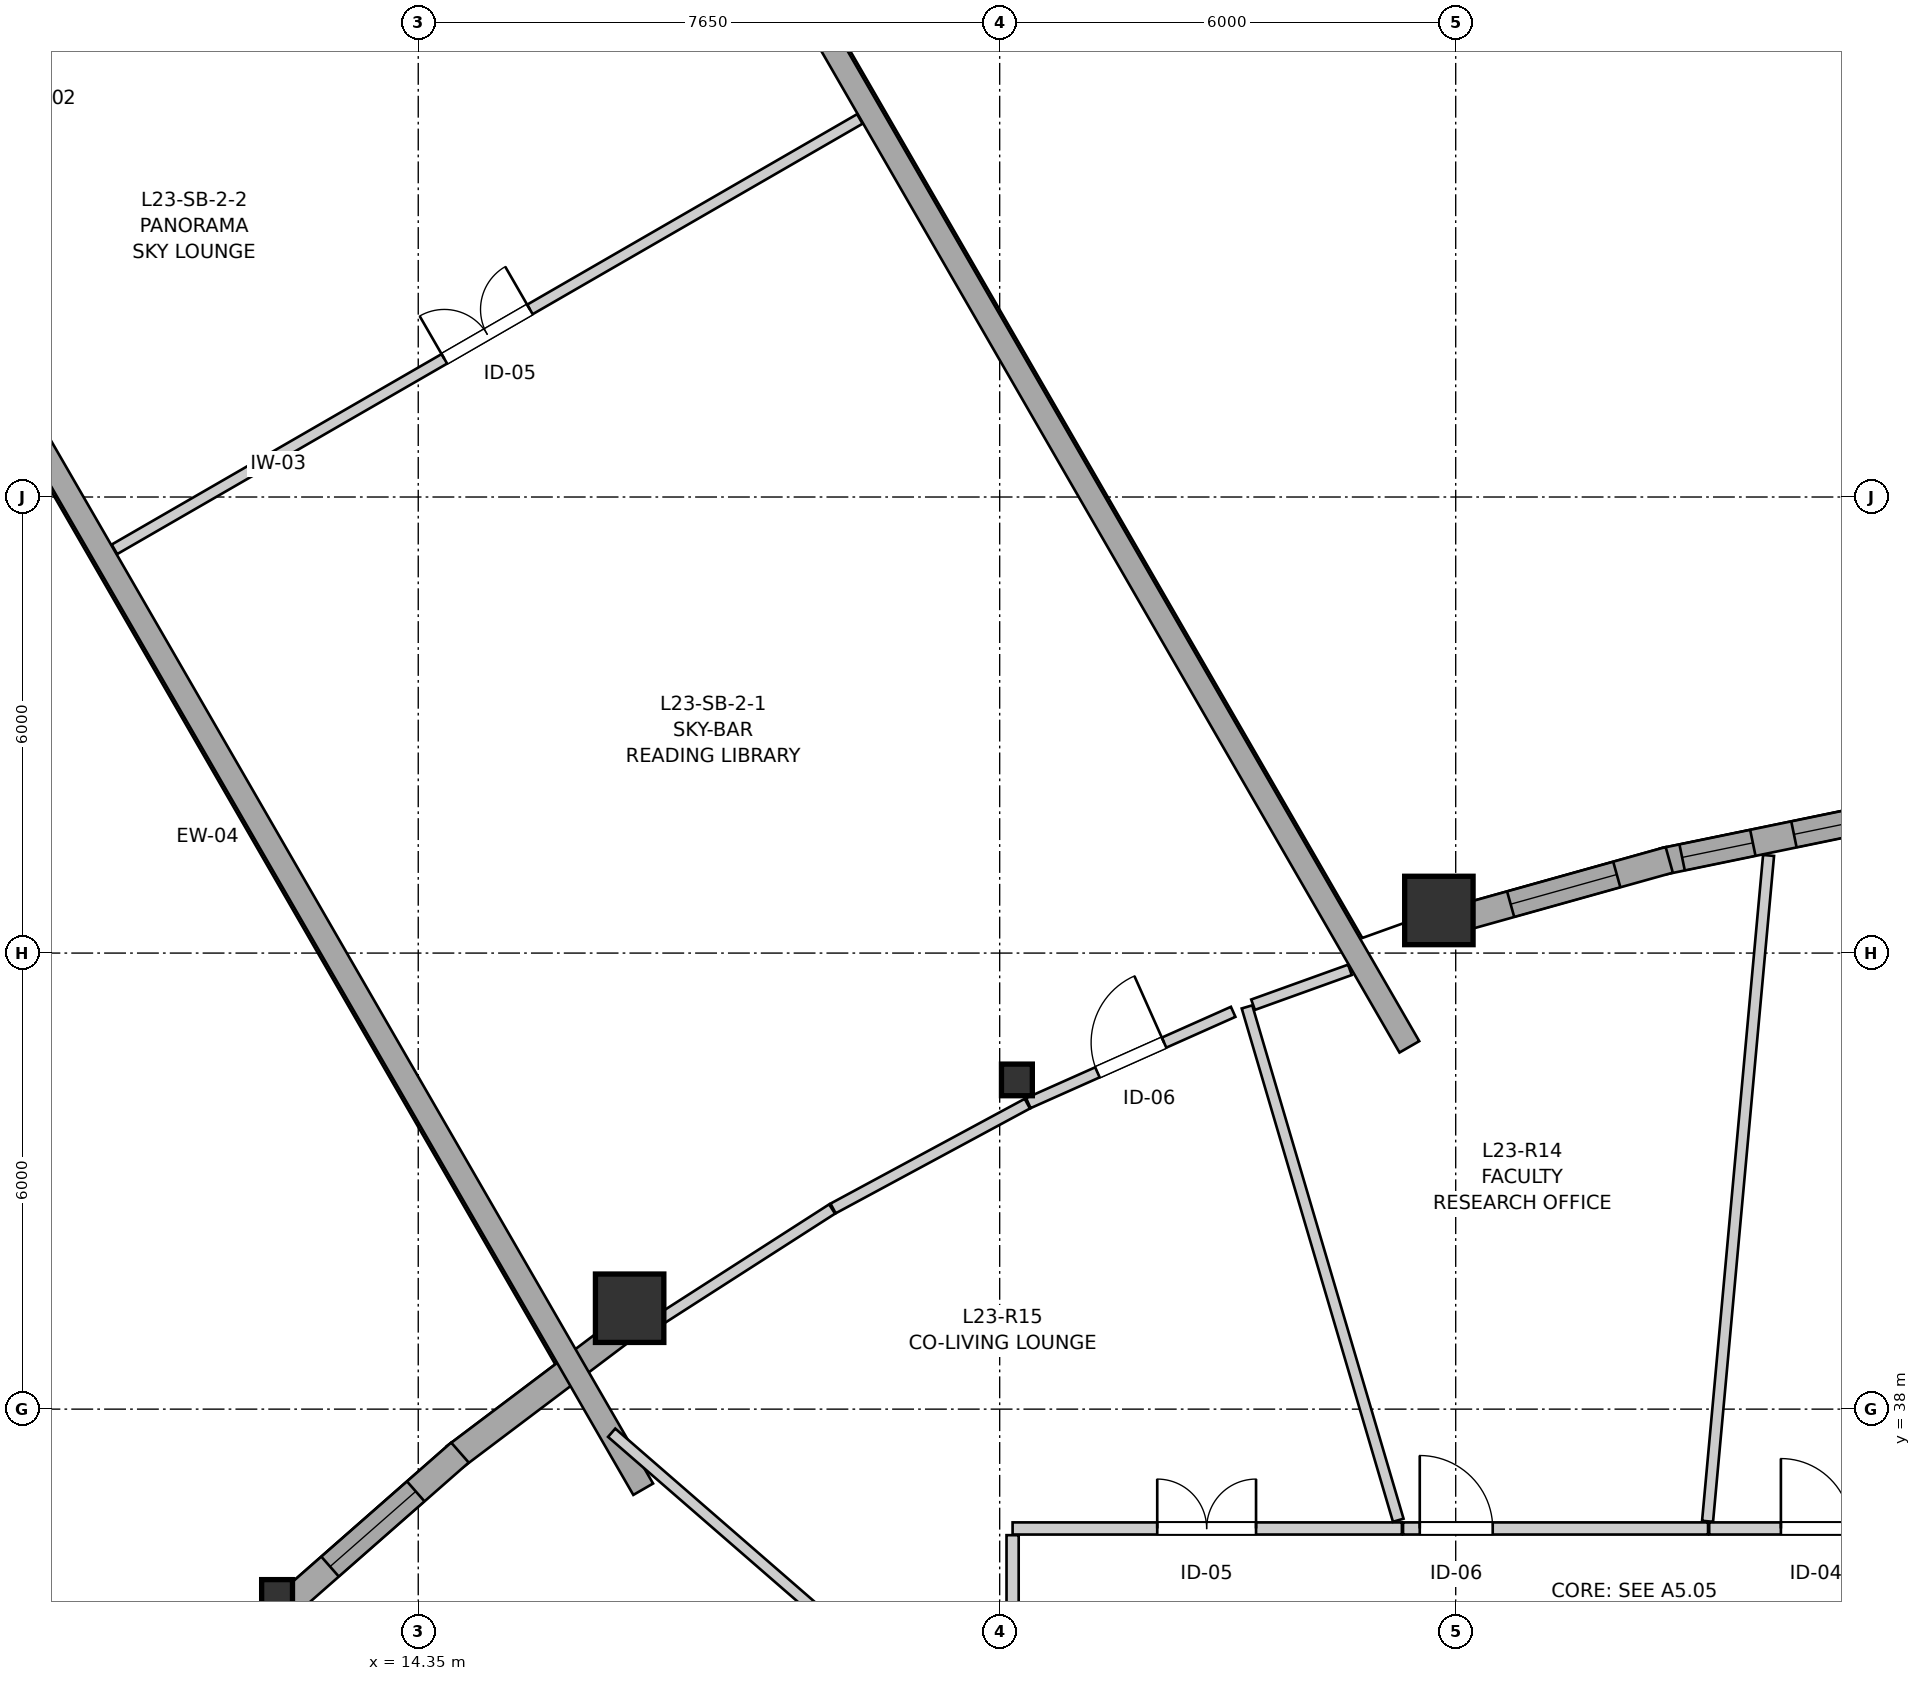
"""IFC4 building model, lengths in metres.
Left out: names, types, materials, properties, quantities, classifications, styles, units other than length and angle.
Written with IfcOpenShell. Run it as: python <this file> out.ifc"""

import sys

from ifc_helpers import new_model, si_unit, direction, frame, frame_2d, origin, origin_2d, place, context, subcontext, project, spatial, rectangle, i_section, extrude, source, transform, mapped, element, fill, save


model = new_model("IFC4")
c1 = context("Model", 3, precision=1e-05, world=origin(), true_north=direction((0.0, 1.0)))
c2 = subcontext(c1, "Body", "Model", "MODEL_VIEW")
j1 = project(units=[si_unit("LENGTHUNIT", "METRE"), si_unit("PLANEANGLEUNIT", "RADIAN")], contexts=[c1])
p1 = place(None, origin())
s1 = spatial("IfcSite", under=j1, at=p1, CompositionType="ELEMENT")
p2 = place(p1, origin())
s2 = spatial("IfcBuilding", under=s1, at=p2, CompositionType="ELEMENT")
p3 = place(p2, frame((0.0, 0.0, 80.0)))
s3 = spatial("IfcBuildingStorey", under=s2, at=p3, CompositionType="ELEMENT", Elevation=80.0)
m1 = source(origin(), c2, "Body", "SweptSolid", [
    extrude(rectangle(XDim=0.9, YDim=0.9, at=origin_2d()), origin(), (0.0, 0.0, 1.0), 2.935),
])
p4 = place(p3, frame((27.779, 44.561, 0.0), z_axis=(0.0, 0.0, 1.0), x_axis=(1.0, 0.0, 0.0)))
e1 = element("IfcColumn", 1, at=p4, inside=s3, PredefinedType="COLUMN", context=c2, shape_type="MappedRepresentation", body=[
    mapped(m1, transform((0.0, 0.0, 0.0), x_axis=(1.0, 0.0, 0.0), y_axis=(0.0, 1.0, 0.0), z_axis=(0.0, 0.0, 1.0), scale=1.0)),
])
m2 = source(origin(), c2, "Body", "SweptSolid", [
    extrude(i_section(OverallWidth=0.406, OverallDepth=0.416, WebThickness=0.027, FlangeThickness=0.044, FilletRadius=0.015, at=origin_2d()), origin(), (0.0, 0.0, 1.0), 2.935),
])
p5 = place(p3, frame((22.227, 42.331, 0.0), z_axis=(0.0, 0.0, 1.0), x_axis=(1.0, 0.0, 0.0)))
e2 = element("IfcColumn", 2, at=p5, inside=s3, PredefinedType="PILASTER", context=c2, shape_type="MappedRepresentation", body=[
    mapped(m2, transform((0.0, 0.0, 0.0), x_axis=(1.0, 0.0, 0.0), y_axis=(0.0, 1.0, 0.0), z_axis=(0.0, 0.0, 1.0), scale=1.0)),
])
p6 = place(p3, frame((17.131, 39.327, 0.0), z_axis=(0.0, 0.0, 1.0), x_axis=(1.0, 0.0, 0.0)))
e3 = element("IfcColumn", 3, at=p6, inside=s3, PredefinedType="COLUMN", context=c2, shape_type="MappedRepresentation", body=[
    mapped(m1, transform((0.0, 0.0, 0.0), x_axis=(1.0, 0.0, 0.0), y_axis=(0.0, 1.0, 0.0), z_axis=(0.0, 0.0, 1.0), scale=1.0)),
])
p7 = place(p3, frame((12.493, 35.549, 0.0), z_axis=(0.0, 0.0, 1.0), x_axis=(1.0, 0.0, 0.0)))
e4 = element("IfcColumn", 4, at=p7, inside=s3, PredefinedType="PILASTER", context=c2, shape_type="MappedRepresentation", body=[
    mapped(m2, transform((0.0, 0.0, 0.0), x_axis=(1.0, 0.0, 0.0), y_axis=(0.0, 1.0, 0.0), z_axis=(0.0, 0.0, 1.0), scale=1.0)),
])
p8 = place(p3, frame((33.803, 45.84, 0.0), z_axis=(0.0, 0.0, 1.0), x_axis=(-0.97943222174, -0.201773444777, 0.0)))
e5 = element("IfcWall", 5, at=p8, inside=s3, PredefinedType="SOLIDWALL", context=c2, shape_type="SweptSolid", body=[
    extrude(rectangle(XDim=3.144, YDim=0.35, at=frame_2d((1.572, 0.0))), origin(), (0.0, 0.0, 1.0), 2.465),
])
p9 = place(p8, frame((0.431, 0.0, 0.82)))
e6 = element("IfcOpeningElement", 6, at=p9, cuts=e5, PredefinedType="OPENING", context=c2, shape_type="SweptSolid", body=[
    extrude(rectangle(XDim=0.95, YDim=1.35, at=frame_2d((0.475, 0.675))), frame((0.0, 0.185, 0.0), z_axis=(0.0, -1.0, 0.0), x_axis=(1.0, 0.0, 0.0)), (0.0, 0.0, 1.0), 0.37),
])
p10 = place(p8, frame((1.933, 0.0, 0.82)))
e7 = element("IfcOpeningElement", 7, at=p10, cuts=e5, PredefinedType="OPENING", context=c2, shape_type="SweptSolid", body=[
    extrude(rectangle(XDim=0.95, YDim=1.35, at=frame_2d((0.475, 0.675))), frame((0.0, 0.185, 0.0), z_axis=(0.0, -1.0, 0.0), x_axis=(1.0, 0.0, 0.0)), (0.0, 0.0, 1.0), 0.37),
])
p11 = place(p3, frame((30.809, 45.227, 0.0), z_axis=(0.0, 0.0, 1.0), x_axis=(-0.963041637143, -0.269352566591, 0.0)))
e8 = element("IfcWall", 8, at=p11, inside=s3, PredefinedType="SOLIDWALL", context=c2, shape_type="SweptSolid", body=[
    extrude(rectangle(XDim=2.873, YDim=0.35, at=frame_2d((1.437, 0.0))), origin(), (0.0, 0.0, 1.0), 2.465),
])
p12 = place(p11, frame((0.717, 0.0, 0.82)))
e9 = element("IfcOpeningElement", 9, at=p12, cuts=e8, PredefinedType="OPENING", context=c2, shape_type="SweptSolid", body=[
    extrude(rectangle(XDim=1.45, YDim=1.25, at=frame_2d((0.725, 0.625))), frame((0.0, 0.185, 0.0), z_axis=(0.0, -1.0, 0.0), x_axis=(1.0, 0.0, 0.0)), (0.0, 0.0, 1.0), 0.37),
])
p13 = place(p3, frame((17.057, 39.052, 0.0), z_axis=(0.0, 0.0, 1.0), x_axis=(-0.798379678642, -0.602154372841, 0.0)))
e10 = element("IfcWall", 10, at=p13, inside=s3, PredefinedType="SOLIDWALL", context=c2, shape_type="SweptSolid", body=[
    extrude(rectangle(XDim=2.79, YDim=0.35, at=frame_2d((1.395, 0.0))), origin(), (0.0, 0.0, 1.0), 2.465),
])
p14 = place(p3, frame((14.899, 37.429, 0.0), z_axis=(0.0, 0.0, 1.0), x_axis=(-0.751526984469, -0.659702350773, 0.0)))
e11 = element("IfcWall", 11, at=p14, inside=s3, PredefinedType="SOLIDWALL", context=c2, shape_type="SweptSolid", body=[
    extrude(rectangle(XDim=3.028, YDim=0.35, at=frame_2d((1.514, 0.0))), origin(), (0.0, 0.0, 1.0), 2.465),
])
p15 = place(p14, frame((0.774, 0.0, 0.82)))
e12 = element("IfcOpeningElement", 12, at=p15, cuts=e11, PredefinedType="OPENING", context=c2, shape_type="SweptSolid", body=[
    extrude(rectangle(XDim=1.5, YDim=1.45, at=frame_2d((0.75, 0.725))), frame((0.0, 0.185, 0.0), z_axis=(0.0, -1.0, 0.0), x_axis=(1.0, 0.0, 0.0)), (0.0, 0.0, 1.0), 0.37),
])
p16 = place(p3, frame((12.603, 35.412, 0.0), z_axis=(0.0, 0.0, 1.0), x_axis=(-0.701972782373, -0.71220377197, 0.0)))
e13 = element("IfcWall", 13, at=p16, inside=s3, PredefinedType="SOLIDWALL", context=c2, shape_type="SweptSolid", body=[
    extrude(rectangle(XDim=3.078, YDim=0.35, at=frame_2d((1.539, 0.0))), origin(), (0.0, 0.0, 1.0), 2.465),
])
p17 = place(p16, frame((0.854, 0.0, 0.82)))
e14 = element("IfcOpeningElement", 14, at=p17, cuts=e13, PredefinedType="OPENING", context=c2, shape_type="SweptSolid", body=[
    extrude(rectangle(XDim=1.35, YDim=1.45, at=frame_2d((0.675, 0.725))), frame((0.0, 0.185, 0.0), z_axis=(0.0, -1.0, 0.0), x_axis=(1.0, 0.0, 0.0)), (0.0, 0.0, 1.0), 0.37),
])
for number, where, z_axis, x_axis in (
    (15, (17.31, 36.946, 0.0), (0.0, 0.0, 1.0), (-0.5, 0.866, 0.0)),
    (16, (27.39, 42.766, 0.0), (0.0, 0.0, 1.0), (-0.5, 0.866, 0.0)),
):
    element("IfcWall", number, at=place(p3, frame(where, z_axis=z_axis, x_axis=x_axis)), inside=s3, PredefinedType="SOLIDWALL", context=c2, shape_type="SweptSolid", body=[
        extrude(rectangle(XDim=20.603, YDim=0.3, at=frame_2d((10.302, 0.0))), origin(), (0.0, 0.0, 1.0), 2.115),
    ])
p18 = place(p3, frame((10.353, 49.312, 0.0), z_axis=(0.0, 0.0, 1.0), x_axis=(0.866036235619, 0.499981238243, 0.0)))
e17 = element("IfcWall", 17, at=p18, inside=s3, PredefinedType="PARTITIONING", context=c2, shape_type="SweptSolid", body=[
    extrude(rectangle(XDim=11.324, YDim=0.145, at=frame_2d((5.662, 0.0))), origin(), (0.0, 0.0, 1.0), 2.353),
])
p19 = place(p18, frame((5.012, 0.0, 0.0)))
e18 = element("IfcOpeningElement", 18, at=p19, cuts=e17, PredefinedType="OPENING", context=c2, shape_type="SweptSolid", body=[
    extrude(rectangle(XDim=1.3, YDim=2.1, at=frame_2d((0.65, 1.05))), frame((0.0, 0.083, 0.0), z_axis=(0.0, -1.0, 0.0), x_axis=(1.0, 0.0, 0.0)), (0.0, 0.0, 1.0), 0.165),
])
p20 = place(p3, frame((22.17, 36.43, 0.0), z_axis=(0.0, 0.0, 1.0), x_axis=(1.0, 0.0, 0.0)))
e19 = element("IfcWall", 19, at=p20, inside=s3, PredefinedType="PARTITIONING", context=c2, shape_type="SweptSolid", body=[
    extrude(rectangle(XDim=5.122, YDim=0.16, at=frame_2d((2.561, 0.0))), origin(), (0.0, 0.0, 1.0), 2.573),
])
p21 = place(p20, frame((1.903, 0.0, 0.0)))
e20 = element("IfcOpeningElement", 20, at=p21, cuts=e19, PredefinedType="OPENING", context=c2, shape_type="SweptSolid", body=[
    extrude(rectangle(XDim=1.3, YDim=2.1, at=frame_2d((0.65, 1.05))), frame((0.0, 0.09, 0.0), z_axis=(0.0, -1.0, 0.0), x_axis=(1.0, 0.0, 0.0)), (0.0, 0.0, 1.0), 0.18),
])
p22 = place(p3, frame((27.307, 36.43, 0.0), z_axis=(0.0, 0.0, 1.0), x_axis=(1.0, 0.0, 0.0)))
e21 = element("IfcWall", 21, at=p22, inside=s3, PredefinedType="PARTITIONING", context=c2, shape_type="SweptSolid", body=[
    extrude(rectangle(XDim=4.013, YDim=0.16, at=frame_2d((2.007, 0.0))), origin(), (0.0, 0.0, 1.0), 2.935),
])
p23 = place(p22, frame((0.22, 0.0, 0.0)))
e22 = element("IfcOpeningElement", 22, at=p23, cuts=e21, PredefinedType="OPENING", context=c2, shape_type="SweptSolid", body=[
    extrude(rectangle(XDim=0.96, YDim=2.1, at=frame_2d((0.48, 1.05))), frame((0.0, 0.09, 0.0), z_axis=(0.0, -1.0, 0.0), x_axis=(1.0, 0.0, 0.0)), (0.0, 0.0, 1.0), 0.18),
])
p24 = place(p3, frame((22.377, 42.026, 0.0), z_axis=(0.0, 0.0, 1.0), x_axis=(0.913387960111, 0.407090204162, 0.0)))
e23 = element("IfcWall", 23, at=p24, inside=s3, PredefinedType="PARTITIONING", context=c2, shape_type="SweptSolid", body=[
    extrude(rectangle(XDim=2.951, YDim=0.145, at=frame_2d((1.475, 0.0))), origin(), (0.0, 0.0, 1.0), 2.453),
])
p25 = place(p24, frame((0.995, 0.0, 0.0)))
e24 = element("IfcOpeningElement", 24, at=p25, cuts=e23, PredefinedType="OPENING", context=c2, shape_type="SweptSolid", body=[
    extrude(rectangle(XDim=0.96, YDim=2.1, at=frame_2d((0.48, 1.05))), frame((0.0, 0.083, 0.0), z_axis=(0.0, -1.0, 0.0), x_axis=(1.0, 0.0, 0.0)), (0.0, 0.0, 1.0), 0.165),
])
p26 = place(p3, frame((31.335, 36.43, 0.0), z_axis=(0.0, 0.0, 1.0), x_axis=(1.0, 0.0, 0.0)))
e25 = element("IfcWall", 25, at=p26, inside=s3, PredefinedType="PARTITIONING", context=c2, shape_type="SweptSolid", body=[
    extrude(rectangle(XDim=2.806, YDim=0.16, at=frame_2d((1.403, 0.0))), origin(), (0.0, 0.0, 1.0), 2.935),
])
p27 = place(p26, frame((0.944, 0.0, 0.0)))
e26 = element("IfcOpeningElement", 26, at=p27, cuts=e25, PredefinedType="OPENING", context=c2, shape_type="SweptSolid", body=[
    extrude(rectangle(XDim=0.92, YDim=2.1, at=frame_2d((0.46, 1.05))), frame((0.0, 0.09, 0.0), z_axis=(0.0, -1.0, 0.0), x_axis=(1.0, 0.0, 0.0)), (0.0, 0.0, 1.0), 0.18),
])
p28 = place(p3, frame((31.314, 36.525, 0.0), z_axis=(0.0, 0.0, 1.0), x_axis=(0.091226381691, 0.995830179942, 0.0)))
e27 = element("IfcWall", 27, at=p28, inside=s3, PredefinedType="PARTITIONING", context=c2, shape_type="SweptSolid", body=[
    extrude(rectangle(XDim=8.797, YDim=0.145, at=frame_2d((4.398, 0.0))), origin(), (0.0, 0.0, 1.0), 2.935),
])
p29 = place(p3, frame((16.895, 37.69, 0.0), z_axis=(0.0, 0.0, 1.0), x_axis=(0.754854710059, -0.655892038907, 0.0)))
e28 = element("IfcWall", 28, at=p29, inside=s3, PredefinedType="PARTITIONING", context=c2, shape_type="SweptSolid", body=[
    extrude(rectangle(XDim=6.811, YDim=0.145, at=frame_2d((3.406, 0.0))), origin(), (0.0, 0.0, 1.0), 2.103),
])
p30 = place(p3, frame((25.254, 43.292, 0.0), z_axis=(0.0, 0.0, 1.0), x_axis=(0.282661880608, -0.959219610543, 0.0)))
e29 = element("IfcWall", 29, at=p30, inside=s3, PredefinedType="PARTITIONING", context=c2, shape_type="SweptSolid", body=[
    extrude(rectangle(XDim=7.041, YDim=0.145, at=frame_2d((3.521, 0.0))), origin(), (0.0, 0.0, 1.0), 2.935),
])
p31 = place(p3, frame((22.17, 33.315, 0.0), z_axis=(0.0, 0.0, 1.0), x_axis=(0.0, 1.0, 0.0)))
e30 = element("IfcWall", 30, at=p31, inside=s3, PredefinedType="PARTITIONING", context=c2, shape_type="SweptSolid", body=[
    extrude(rectangle(XDim=3.027, YDim=0.16, at=frame_2d((1.514, 0.0))), origin(), (0.0, 0.0, 1.0), 2.935),
])
p32 = place(p3, frame((17.326, 39.048, 0.0), z_axis=(0.0, 0.0, 1.0), x_axis=(0.841527071554, 0.540214945963, 0.0)))
e31 = element("IfcWall", 31, at=p32, inside=s3, PredefinedType="PARTITIONING", context=c2, shape_type="SweptSolid", body=[
    extrude(rectangle(XDim=2.934, YDim=0.145, at=frame_2d((1.467, 0.0))), origin(), (0.0, 0.0, 1.0), 2.453),
])
p33 = place(p3, frame((19.808, 40.64, 0.0), z_axis=(0.0, 0.0, 1.0), x_axis=(0.880106382364, 0.474776532404, 0.0)))
e32 = element("IfcWall", 32, at=p33, inside=s3, PredefinedType="PARTITIONING", context=c2, shape_type="SweptSolid", body=[
    extrude(rectangle(XDim=2.904, YDim=0.145, at=frame_2d((1.452, 0.0))), origin(), (0.0, 0.0, 1.0), 2.453),
])
p34 = place(p3, frame((25.334, 43.321, 0.0), z_axis=(0.0, 0.0, 1.0), x_axis=(0.940956330278, 0.3385279671, 0.0)))
e33 = element("IfcWall", 33, at=p34, inside=s3, PredefinedType="PARTITIONING", context=c2, shape_type="SweptSolid", body=[
    extrude(rectangle(XDim=1.354, YDim=0.145, at=frame_2d((0.677, 0.0))), origin(), (0.0, 0.0, 1.0), 2.453),
])
m3 = source(origin(), c2, "Body", "SweptSolid", [
    extrude(rectangle(XDim=0.95, YDim=1.35, at=frame_2d((0.475, 0.675))), frame((0.0, 0.03, 0.0), z_axis=(0.0, -1.0, 0.0), x_axis=(1.0, 0.0, 0.0)), (0.0, 0.0, 1.0), 0.06),
])
p35 = place(p9, origin())
e34 = element("IfcWindow", 34, at=p35, inside=s3, PartitioningType="SINGLE_PANEL", PredefinedType="WINDOW", context=c2, shape_type="MappedRepresentation", body=[
    mapped(m3, transform((0.0, 0.0, 0.0), x_axis=(1.0, 0.0, 0.0), y_axis=(0.0, 1.0, 0.0), z_axis=(0.0, 0.0, 1.0), scale=1.0)),
])
fill(e6, e34)
p36 = place(p10, origin())
e35 = element("IfcWindow", 35, at=p36, inside=s3, PartitioningType="SINGLE_PANEL", PredefinedType="WINDOW", context=c2, shape_type="MappedRepresentation", body=[
    mapped(m3, transform((0.0, 0.0, 0.0), x_axis=(1.0, 0.0, 0.0), y_axis=(0.0, 1.0, 0.0), z_axis=(0.0, 0.0, 1.0), scale=1.0)),
])
fill(e7, e35)
m4 = source(origin(), c2, "Body", "SweptSolid", [
    extrude(rectangle(XDim=1.45, YDim=1.25, at=frame_2d((0.725, 0.625))), frame((0.0, 0.03, 0.0), z_axis=(0.0, -1.0, 0.0), x_axis=(1.0, 0.0, 0.0)), (0.0, 0.0, 1.0), 0.06),
])
p37 = place(p12, origin())
e36 = element("IfcWindow", 36, at=p37, inside=s3, PartitioningType="SINGLE_PANEL", PredefinedType="WINDOW", context=c2, shape_type="MappedRepresentation", body=[
    mapped(m4, transform((0.0, 0.0, 0.0), x_axis=(1.0, 0.0, 0.0), y_axis=(0.0, 1.0, 0.0), z_axis=(0.0, 0.0, 1.0), scale=1.0)),
])
fill(e9, e36)
m5 = source(origin(), c2, "Body", "SweptSolid", [
    extrude(rectangle(XDim=1.5, YDim=1.45, at=frame_2d((0.75, 0.725))), frame((0.0, 0.03, 0.0), z_axis=(0.0, -1.0, 0.0), x_axis=(1.0, 0.0, 0.0)), (0.0, 0.0, 1.0), 0.06),
])
p38 = place(p15, origin())
e37 = element("IfcWindow", 37, at=p38, inside=s3, PartitioningType="SINGLE_PANEL", PredefinedType="WINDOW", context=c2, shape_type="MappedRepresentation", body=[
    mapped(m5, transform((0.0, 0.0, 0.0), x_axis=(1.0, 0.0, 0.0), y_axis=(0.0, 1.0, 0.0), z_axis=(0.0, 0.0, 1.0), scale=1.0)),
])
fill(e12, e37)
m6 = source(origin(), c2, "Body", "SweptSolid", [
    extrude(rectangle(XDim=1.3, YDim=2.1, at=frame_2d((0.65, 1.05))), frame((0.0, 0.025, 0.0), z_axis=(0.0, -1.0, 0.0), x_axis=(1.0, 0.0, 0.0)), (0.0, 0.0, 1.0), 0.05),
])
p39 = place(p19, origin())
e38 = element("IfcDoor", 38, at=p39, inside=s3, OperationType="DOUBLE_DOOR_SINGLE_SWING", PredefinedType="DOOR", context=c2, shape_type="MappedRepresentation", body=[
    mapped(m6, transform((0.0, 0.0, 0.0), x_axis=(1.0, 0.0, 0.0), y_axis=(0.0, 1.0, 0.0), z_axis=(0.0, 0.0, 1.0), scale=1.0)),
])
fill(e18, e38)
p40 = place(p21, origin())
e39 = element("IfcDoor", 39, at=p40, inside=s3, OperationType="DOUBLE_DOOR_SINGLE_SWING", PredefinedType="DOOR", context=c2, shape_type="MappedRepresentation", body=[
    mapped(m6, transform((0.0, 0.0, 0.0), x_axis=(1.0, 0.0, 0.0), y_axis=(0.0, 1.0, 0.0), z_axis=(0.0, 0.0, 1.0), scale=1.0)),
])
fill(e20, e39)
m7 = source(origin(), c2, "Body", "SweptSolid", [
    extrude(rectangle(XDim=0.96, YDim=2.1, at=frame_2d((0.48, 1.05))), frame((0.0, 0.025, 0.0), z_axis=(0.0, -1.0, 0.0), x_axis=(1.0, 0.0, 0.0)), (0.0, 0.0, 1.0), 0.05),
])
p41 = place(p23, origin())
e40 = element("IfcDoor", 40, at=p41, inside=s3, OperationType="SINGLE_SWING_LEFT", PredefinedType="DOOR", context=c2, shape_type="MappedRepresentation", body=[
    mapped(m7, transform((0.0, 0.0, 0.0), x_axis=(1.0, 0.0, 0.0), y_axis=(0.0, 1.0, 0.0), z_axis=(0.0, 0.0, 1.0), scale=1.0)),
])
fill(e22, e40)
p42 = place(p25, origin())
e41 = element("IfcDoor", 41, at=p42, inside=s3, OperationType="SINGLE_SWING_RIGHT", PredefinedType="DOOR", context=c2, shape_type="MappedRepresentation", body=[
    mapped(m7, transform((0.0, 0.0, 0.0), x_axis=(1.0, 0.0, 0.0), y_axis=(0.0, 1.0, 0.0), z_axis=(0.0, 0.0, 1.0), scale=1.0)),
])
fill(e24, e41)
m8 = source(origin(), c2, "Body", "SweptSolid", [
    extrude(rectangle(XDim=0.92, YDim=2.1, at=frame_2d((0.46, 1.05))), frame((0.0, 0.025, 0.0), z_axis=(0.0, -1.0, 0.0), x_axis=(1.0, 0.0, 0.0)), (0.0, 0.0, 1.0), 0.05),
])
p43 = place(p27, origin())
e42 = element("IfcDoor", 42, at=p43, inside=s3, OperationType="SINGLE_SWING_LEFT", PredefinedType="DOOR", context=c2, shape_type="MappedRepresentation", body=[
    mapped(m8, transform((0.0, 0.0, 0.0), x_axis=(1.0, 0.0, 0.0), y_axis=(0.0, 1.0, 0.0), z_axis=(0.0, 0.0, 1.0), scale=1.0)),
])
fill(e26, e42)
save(model, sys.argv[1])
